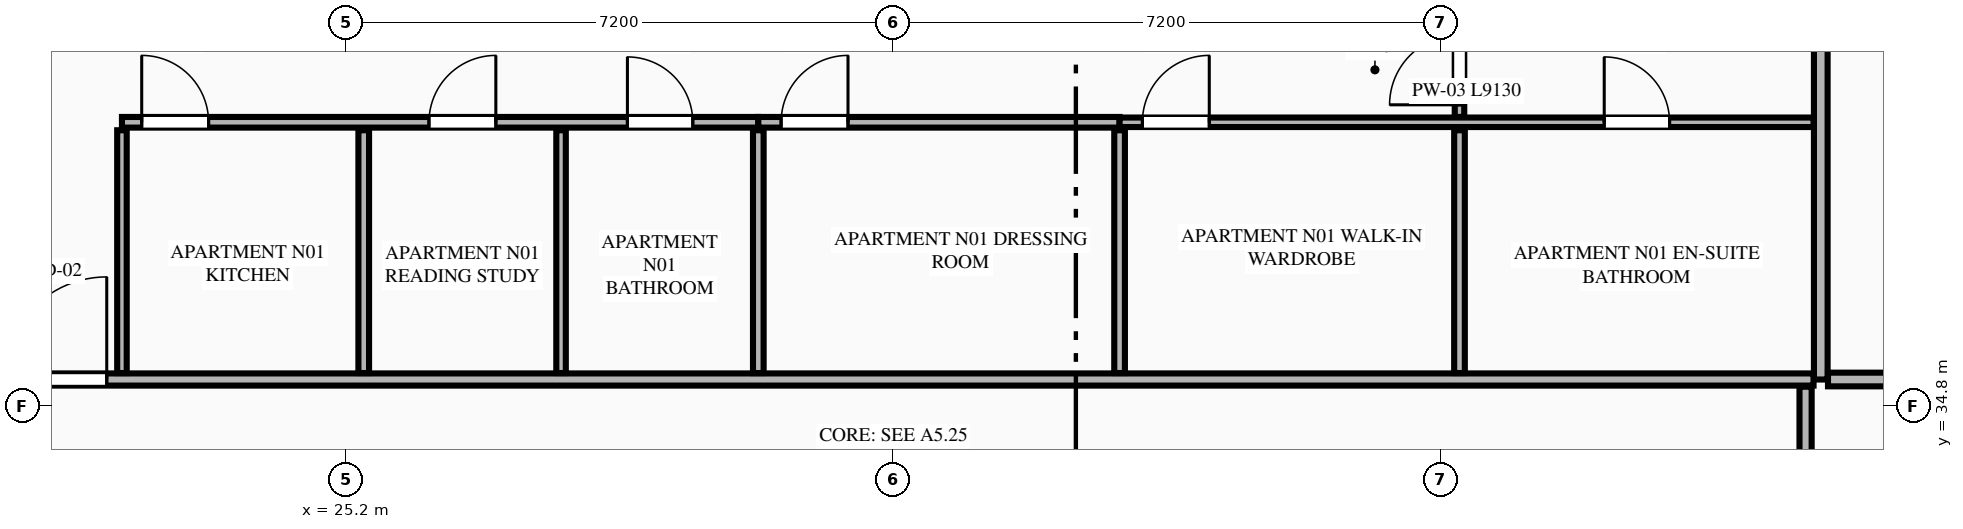
"""IFC4 building model, lengths in metres.
Left out: names, types, materials, properties, quantities, classifications, styles, units other than length and angle.
Written with IfcOpenShell. Run it as: python <this file> out.ifc"""

import sys

from ifc_helpers import new_model, si_unit, direction, frame, frame_2d, origin, place, context, subcontext, project, spatial, rectangle, extrude, element, fill, save


model = new_model("IFC4")
c1 = context("Model", 3, precision=1e-05, world=origin(), true_north=direction((0.0, 1.0)))
c2 = subcontext(c1, "Body", "Model", "MODEL_VIEW")
j1 = project(units=[si_unit("LENGTHUNIT", "METRE"), si_unit("PLANEANGLEUNIT", "RADIAN")], contexts=[c1])
p1 = place(None, origin())
s1 = spatial("IfcSite", under=j1, at=p1, CompositionType="ELEMENT")
p2 = place(p1, origin())
s2 = spatial("IfcBuilding", under=s1, at=p2, CompositionType="ELEMENT")
p3 = place(p2, frame((0.0, 0.0, 218.05)))
s3 = spatial("IfcBuildingStorey", under=s2, at=p3, CompositionType="ELEMENT", Elevation=218.05)
p4 = place(p3, frame((44.6, 35.15, 0.0), z_axis=(0.0, 0.0, 1.0), x_axis=(0.0, 1.0, 0.0)))
e1 = element("IfcWall", 1, at=p4, inside=s3, PredefinedType="PARTITIONING", context=c2, shape_type="SweptSolid", body=[
    extrude(rectangle(XDim=10.482, YDim=0.18, at=frame_2d((5.241, 0.0))), origin(), (0.0, 0.0, 1.0), 3.27),
])
p5 = place(p3, frame((20.295, 35.15, 0.0), z_axis=(0.0, 0.0, 1.0), x_axis=(1.0, 0.0, 0.0)))
e2 = element("IfcWall", 2, at=p5, inside=s3, PredefinedType="PARTITIONING", context=c2, shape_type="SweptSolid", body=[
    extrude(rectangle(XDim=24.21, YDim=0.16, at=frame_2d((12.105, 0.0))), origin(), (0.0, 0.0, 1.0), 3.27),
])
p6 = place(p5, frame((0.405, 0.0, 0.0)))
e3 = element("IfcOpeningElement", 3, at=p6, cuts=e2, PredefinedType="OPENING", context=c2, shape_type="SweptSolid", body=[
    extrude(rectangle(XDim=1.35, YDim=2.35, at=frame_2d((0.675, 1.175))), frame((0.0, 0.09, 0.0), z_axis=(0.0, -1.0, 0.0), x_axis=(1.0, 0.0, 0.0)), (0.0, 0.0, 1.0), 0.18),
])
p7 = place(p3, frame((22.25, 35.235, 0.0), z_axis=(0.0, 0.0, 1.0), x_axis=(0.0, 1.0, 0.0)))
e4 = element("IfcWall", 4, at=p7, inside=s3, PredefinedType="PARTITIONING", context=c2, shape_type="SweptSolid", body=[
    extrude(rectangle(XDim=3.194, YDim=0.125, at=frame_2d((1.597, 0.0))), origin(), (0.0, 0.0, 1.0), 2.727),
])
p8 = place(p3, frame((22.25, 38.534, 0.0), z_axis=(0.0, 0.0, 1.0), x_axis=(1.0, 0.0, 0.0)))
e5 = element("IfcWall", 5, at=p8, inside=s3, PredefinedType="PLUMBINGWALL", context=c2, shape_type="SweptSolid", body=[
    extrude(rectangle(XDim=8.372, YDim=0.14, at=frame_2d((4.186, 0.0))), origin(), (0.0, 0.0, 1.0), 3.27),
])
p9 = place(p8, frame((6.65, 0.0, 0.0)))
e6 = element("IfcOpeningElement", 6, at=p9, cuts=e5, PredefinedType="OPENING", context=c2, shape_type="SweptSolid", body=[
    extrude(rectangle(XDim=0.86, YDim=2.1, at=frame_2d((0.43, 1.05))), frame((0.0, 0.08, 0.0), z_axis=(0.0, -1.0, 0.0), x_axis=(1.0, 0.0, 0.0)), (0.0, 0.0, 1.0), 0.16),
])
p10 = place(p8, frame((0.26, 0.0, 0.0)))
e7 = element("IfcOpeningElement", 7, at=p10, cuts=e5, PredefinedType="OPENING", context=c2, shape_type="SweptSolid", body=[
    extrude(rectangle(XDim=0.88, YDim=2.15, at=frame_2d((0.44, 1.075))), frame((0.0, 0.08, 0.0), z_axis=(0.0, -1.0, 0.0), x_axis=(1.0, 0.0, 0.0)), (0.0, 0.0, 1.0), 0.16),
])
p11 = place(p8, frame((4.039, 0.0, 0.0)))
e8 = element("IfcOpeningElement", 8, at=p11, cuts=e5, PredefinedType="OPENING", context=c2, shape_type="SweptSolid", body=[
    extrude(rectangle(XDim=0.88, YDim=2.15, at=frame_2d((0.44, 1.075))), frame((0.0, 0.08, 0.0), z_axis=(0.0, -1.0, 0.0), x_axis=(1.0, 0.0, 0.0)), (0.0, 0.0, 1.0), 0.16),
])
p12 = place(p3, frame((30.622, 38.534, 0.0), z_axis=(0.0, 0.0, 1.0), x_axis=(1.0, 0.0, 0.0)))
e9 = element("IfcWall", 9, at=p12, inside=s3, PredefinedType="PLUMBINGWALL", context=c2, shape_type="SweptSolid", body=[
    extrude(rectangle(XDim=4.753, YDim=0.14, at=frame_2d((2.376, 0.0))), origin(), (0.0, 0.0, 1.0), 3.27),
])
p13 = place(p12, frame((0.3, 0.0, 0.0)))
e10 = element("IfcOpeningElement", 10, at=p13, cuts=e9, PredefinedType="OPENING", context=c2, shape_type="SweptSolid", body=[
    extrude(rectangle(XDim=0.88, YDim=2.15, at=frame_2d((0.44, 1.075))), frame((0.0, 0.08, 0.0), z_axis=(0.0, -1.0, 0.0), x_axis=(1.0, 0.0, 0.0)), (0.0, 0.0, 1.0), 0.16),
])
p14 = place(p3, frame((35.375, 38.534, 0.0), z_axis=(0.0, 0.0, 1.0), x_axis=(1.0, 0.0, 0.0)))
e11 = element("IfcWall", 11, at=p14, inside=s3, PredefinedType="PARTITIONING", context=c2, shape_type="SweptSolid", body=[
    extrude(rectangle(XDim=9.13, YDim=0.125, at=frame_2d((4.565, 0.0))), origin(), (0.0, 0.0, 1.0), 3.27),
])
p15 = place(p14, frame((6.376, 0.0, 0.0)))
e12 = element("IfcOpeningElement", 12, at=p15, cuts=e11, PredefinedType="OPENING", context=c2, shape_type="SweptSolid", body=[
    extrude(rectangle(XDim=0.86, YDim=2.1, at=frame_2d((0.43, 1.05))), frame((0.0, 0.073, 0.0), z_axis=(0.0, -1.0, 0.0), x_axis=(1.0, 0.0, 0.0)), (0.0, 0.0, 1.0), 0.145),
])
p16 = place(p14, frame((0.3, 0.0, 0.0)))
e13 = element("IfcOpeningElement", 13, at=p16, cuts=e11, PredefinedType="OPENING", context=c2, shape_type="SweptSolid", body=[
    extrude(rectangle(XDim=0.88, YDim=2.15, at=frame_2d((0.44, 1.075))), frame((0.0, 0.073, 0.0), z_axis=(0.0, -1.0, 0.0), x_axis=(1.0, 0.0, 0.0)), (0.0, 0.0, 1.0), 0.145),
])
p17 = place(p3, frame((25.431, 35.235, 0.0), z_axis=(0.0, 0.0, 1.0), x_axis=(0.0, 1.0, 0.0)))
e14 = element("IfcWall", 14, at=p17, inside=s3, PredefinedType="PLUMBINGWALL", context=c2, shape_type="SweptSolid", body=[
    extrude(rectangle(XDim=3.194, YDim=0.14, at=frame_2d((1.597, 0.0))), origin(), (0.0, 0.0, 1.0), 3.27),
])
p18 = place(p3, frame((28.027, 35.235, 0.0), z_axis=(0.0, 0.0, 1.0), x_axis=(0.0, 1.0, 0.0)))
e15 = element("IfcWall", 15, at=p18, inside=s3, PredefinedType="PARTITIONING", context=c2, shape_type="SweptSolid", body=[
    extrude(rectangle(XDim=3.194, YDim=0.125, at=frame_2d((1.597, 0.0))), origin(), (0.0, 0.0, 1.0), 3.27),
])
p19 = place(p3, frame((39.847, 38.604, 0.0), z_axis=(0.0, 0.0, 1.0), x_axis=(0.0, 1.0, 0.0)))
e16 = element("IfcWall", 16, at=p19, inside=s3, PredefinedType="PARTITIONING", context=c2, shape_type="SweptSolid", body=[
    extrude(rectangle(XDim=1.33, YDim=0.125, at=frame_2d((0.665, 0.0))), origin(), (0.0, 0.0, 1.0), 3.27),
])
p20 = place(p19, frame((0.16, 0.0, 0.0)))
e17 = element("IfcOpeningElement", 17, at=p20, cuts=e16, PredefinedType="OPENING", context=c2, shape_type="SweptSolid", body=[
    extrude(rectangle(XDim=0.92, YDim=2.15, at=frame_2d((0.46, 1.075))), frame((0.0, 0.073, 0.0), z_axis=(0.0, -1.0, 0.0), x_axis=(1.0, 0.0, 0.0)), (0.0, 0.0, 1.0), 0.145),
])
for number, where, z_axis, x_axis in (
    (18, (30.622, 35.235, 0.0), (0.0, 0.0, 1.0), (0.0, 1.0, 0.0)),
    (19, (35.375, 35.235, 0.0), (0.0, 0.0, 1.0), (0.0, 1.0, 0.0)),
    (20, (39.847, 35.235, 0.0), (0.0, 0.0, 1.0), (0.0, 1.0, 0.0)),
):
    element("IfcWall", number, at=place(p3, frame(where, z_axis=z_axis, x_axis=x_axis)), inside=s3, PredefinedType="PLUMBINGWALL", context=c2, shape_type="SweptSolid", body=[
        extrude(rectangle(XDim=3.194, YDim=0.14, at=frame_2d((1.597, 0.0))), origin(), (0.0, 0.0, 1.0), 3.27),
    ])
p21 = place(p3, frame((44.695, 35.15, 0.0), z_axis=(0.0, 0.0, 1.0), x_axis=(1.0, 0.0, 0.0)))
e21 = element("IfcWall", 21, at=p21, inside=s3, PredefinedType="PARTITIONING", context=c2, shape_type="SweptSolid", body=[
    extrude(rectangle(XDim=5.995, YDim=0.18, at=frame_2d((2.998, 0.0))), origin(), (0.0, 0.0, 1.0), 3.27),
])
p22 = place(p3, frame((44.4, 26.173, 0.0), z_axis=(0.0, 0.0, 1.0), x_axis=(0.0, 1.0, 0.0)))
e22 = element("IfcWall", 22, at=p22, inside=s3, PredefinedType="PARTITIONING", context=c2, shape_type="SweptSolid", body=[
    extrude(rectangle(XDim=8.882, YDim=0.16, at=frame_2d((4.441, 0.0))), origin(), (0.0, 0.0, 1.0), 3.27),
])
p23 = place(p22, frame((0.4, 0.0, 0.0)))
e23 = element("IfcOpeningElement", 23, at=p23, cuts=e22, PredefinedType="OPENING", context=c2, shape_type="SweptSolid", body=[
    extrude(rectangle(XDim=1.02, YDim=2.25, at=frame_2d((0.51, 1.125))), frame((0.0, 0.09, 0.0), z_axis=(0.0, -1.0, 0.0), x_axis=(1.0, 0.0, 0.0)), (0.0, 0.0, 1.0), 0.18),
])
p24 = place(p9, origin())
e24 = element("IfcDoor", 24, at=p24, inside=s3, OperationType="SINGLE_SWING_LEFT", PredefinedType="DOOR", context=c2, shape_type="SweptSolid", body=[
    extrude(rectangle(XDim=0.86, YDim=2.1, at=frame_2d((0.43, 1.05))), frame((0.0, 0.025, 0.0), z_axis=(0.0, -1.0, 0.0), x_axis=(1.0, 0.0, 0.0)), (0.0, 0.0, 1.0), 0.05),
])
fill(e6, e24)
p25 = place(p15, origin())
e25 = element("IfcDoor", 25, at=p25, inside=s3, OperationType="SINGLE_SWING_LEFT", PredefinedType="DOOR", context=c2, shape_type="SweptSolid", body=[
    extrude(rectangle(XDim=0.86, YDim=2.1, at=frame_2d((0.43, 1.05))), frame((0.0, 0.025, 0.0), z_axis=(0.0, -1.0, 0.0), x_axis=(1.0, 0.0, 0.0)), (0.0, 0.0, 1.0), 0.05),
])
fill(e12, e25)
p26 = place(p6, origin())
e26 = element("IfcDoor", 26, at=p26, inside=s3, OperationType="SINGLE_SWING_RIGHT", PredefinedType="DOOR", context=c2, shape_type="SweptSolid", body=[
    extrude(rectangle(XDim=1.35, YDim=2.35, at=frame_2d((0.675, 1.175))), frame((0.0, 0.025, 0.0), z_axis=(0.0, -1.0, 0.0), x_axis=(1.0, 0.0, 0.0)), (0.0, 0.0, 1.0), 0.05),
])
fill(e3, e26)
p27 = place(p10, origin())
e27 = element("IfcDoor", 27, at=p27, inside=s3, OperationType="SINGLE_SWING_LEFT", PredefinedType="DOOR", context=c2, shape_type="SweptSolid", body=[
    extrude(rectangle(XDim=0.88, YDim=2.15, at=frame_2d((0.44, 1.075))), frame((0.0, 0.025, 0.0), z_axis=(0.0, -1.0, 0.0), x_axis=(1.0, 0.0, 0.0)), (0.0, 0.0, 1.0), 0.05),
])
fill(e7, e27)
p28 = place(p11, origin())
e28 = element("IfcDoor", 28, at=p28, inside=s3, OperationType="SINGLE_SWING_RIGHT", PredefinedType="DOOR", context=c2, shape_type="SweptSolid", body=[
    extrude(rectangle(XDim=0.88, YDim=2.15, at=frame_2d((0.44, 1.075))), frame((0.0, 0.025, 0.0), z_axis=(0.0, -1.0, 0.0), x_axis=(1.0, 0.0, 0.0)), (0.0, 0.0, 1.0), 0.05),
])
fill(e8, e28)
p29 = place(p13, origin())
e29 = element("IfcDoor", 29, at=p29, inside=s3, OperationType="SINGLE_SWING_RIGHT", PredefinedType="DOOR", context=c2, shape_type="SweptSolid", body=[
    extrude(rectangle(XDim=0.88, YDim=2.15, at=frame_2d((0.44, 1.075))), frame((0.0, 0.025, 0.0), z_axis=(0.0, -1.0, 0.0), x_axis=(1.0, 0.0, 0.0)), (0.0, 0.0, 1.0), 0.05),
])
fill(e10, e29)
p30 = place(p20, origin())
e30 = element("IfcDoor", 30, at=p30, inside=s3, OperationType="SINGLE_SWING_LEFT", PredefinedType="DOOR", context=c2, shape_type="SweptSolid", body=[
    extrude(rectangle(XDim=0.92, YDim=2.15, at=frame_2d((0.46, 1.075))), frame((0.0, 0.025, 0.0), z_axis=(0.0, -1.0, 0.0), x_axis=(1.0, 0.0, 0.0)), (0.0, 0.0, 1.0), 0.05),
])
fill(e17, e30)
p31 = place(p16, origin())
e31 = element("IfcDoor", 31, at=p31, inside=s3, OperationType="SINGLE_SWING_RIGHT", PredefinedType="DOOR", context=c2, shape_type="SweptSolid", body=[
    extrude(rectangle(XDim=0.88, YDim=2.15, at=frame_2d((0.44, 1.075))), frame((0.0, 0.025, 0.0), z_axis=(0.0, -1.0, 0.0), x_axis=(1.0, 0.0, 0.0)), (0.0, 0.0, 1.0), 0.05),
])
fill(e13, e31)
save(model, sys.argv[1])
